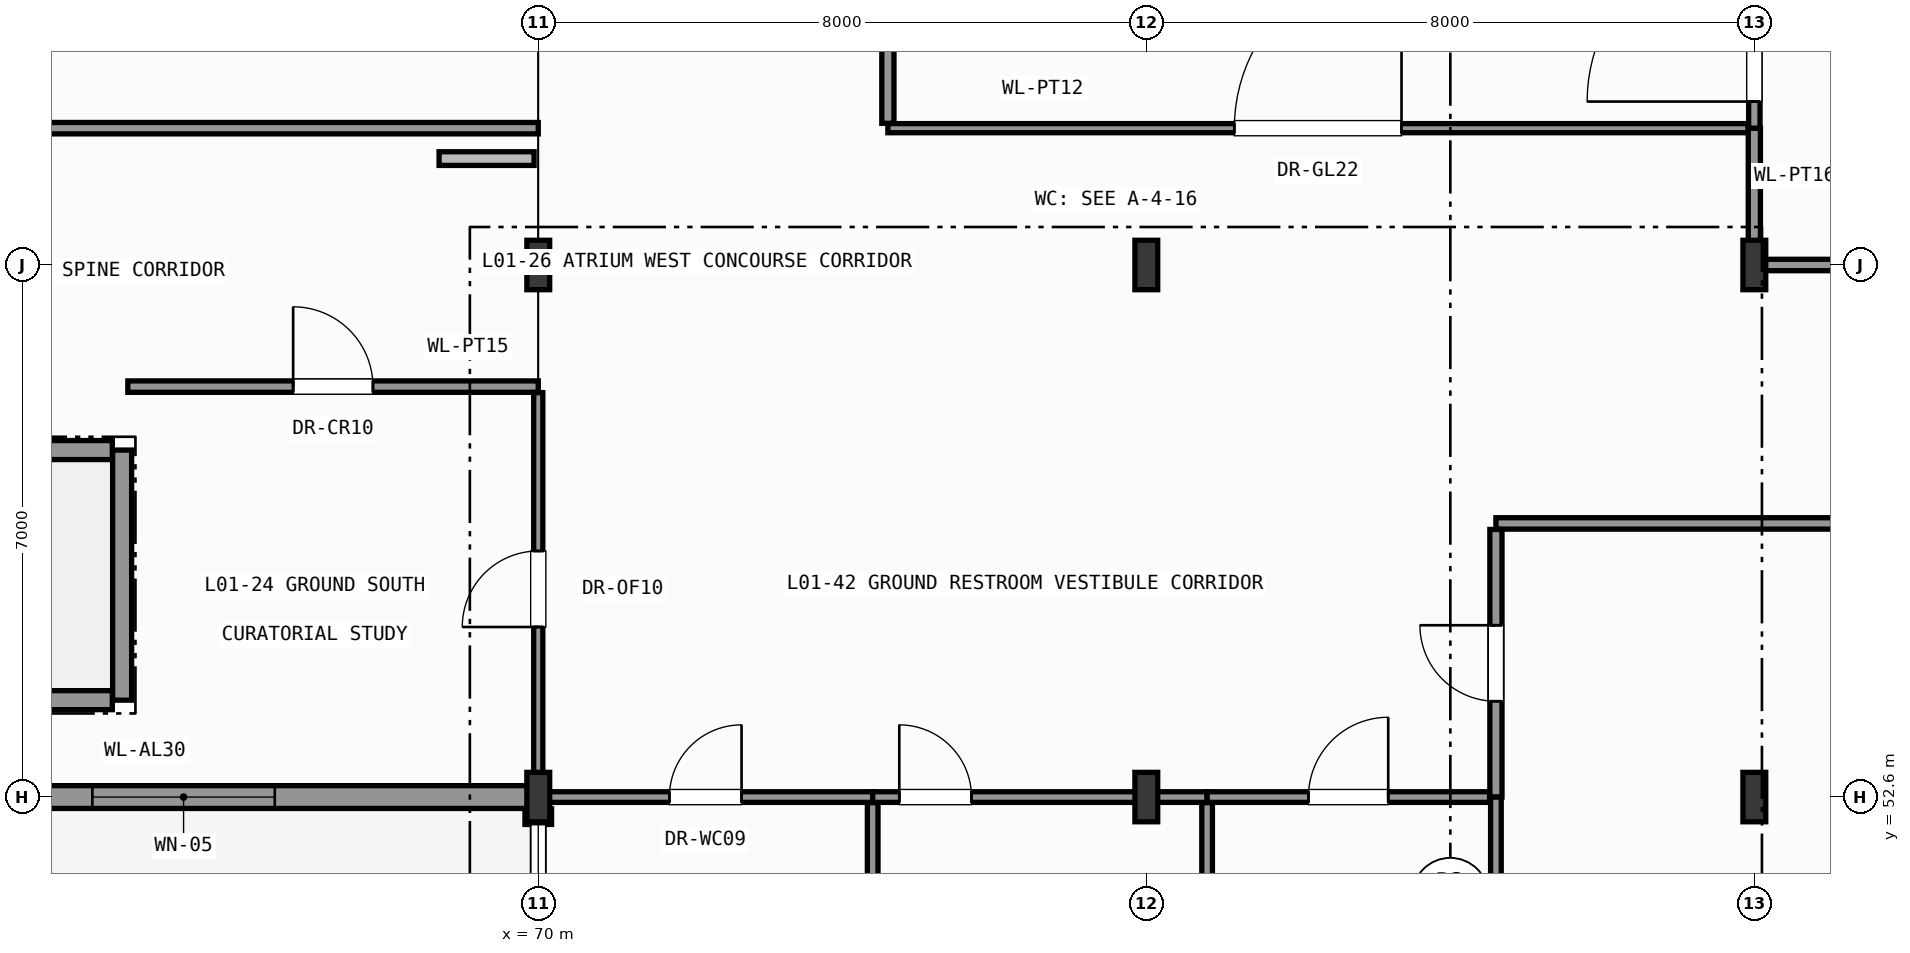
"""IFC4 building model, lengths in metres.
Left out: names, types, materials, properties, quantities, classifications, styles, units other than length and angle.
Written with IfcOpenShell. Run it as: python <this file> out.ifc"""

import sys

from ifc_helpers import new_model, si_unit, direction, frame, frame_2d, origin, origin_2d, place, context, subcontext, project, spatial, rectangle, i_section, extrude, element, fill, save


model = new_model("IFC4")
c1 = context("Model", 3, precision=1e-05, world=origin(), true_north=direction((0.0, 1.0)))
c2 = subcontext(c1, "Body", "Model", "MODEL_VIEW")
j1 = project(units=[si_unit("LENGTHUNIT", "METRE"), si_unit("PLANEANGLEUNIT", "RADIAN")], contexts=[c1])
p1 = place(None, origin())
s1 = spatial("IfcSite", under=j1, at=p1, CompositionType="ELEMENT")
p2 = place(p1, origin())
s2 = spatial("IfcBuilding", under=s1, at=p2, CompositionType="ELEMENT")
p3 = place(p2, origin())
s3 = spatial("IfcBuildingStorey", under=s2, at=p3, CompositionType="ELEMENT", Elevation=0.0)
for number, where, z_axis, x_axis in (
    (1, (70.0, 52.6, 0.0), (0.0, 0.0, 1.0), (1.0, 0.0, 0.0)),
    (2, (70.0, 59.6, 0.0), (0.0, 0.0, 1.0), (1.0, 0.0, 0.0)),
    (3, (78.0, 52.6, 0.0), (0.0, 0.0, 1.0), (1.0, 0.0, 0.0)),
    (4, (78.0, 59.6, 0.0), (0.0, 0.0, 1.0), (1.0, 0.0, 0.0)),
    (5, (86.0, 52.6, 0.0), (0.0, 0.0, 1.0), (1.0, 0.0, 0.0)),
    (6, (86.0, 59.6, 0.0), (0.0, 0.0, 1.0), (1.0, 0.0, 0.0)),
):
    element("IfcColumn", number, at=place(p3, frame(where, z_axis=z_axis, x_axis=x_axis)), inside=s3, PredefinedType="COLUMN", context=c2, shape_type="SweptSolid", body=[
        extrude(i_section(OverallWidth=0.3, OverallDepth=0.65, WebThickness=0.016, FlangeThickness=0.031, FilletRadius=0.027, at=origin_2d()), origin(), (0.0, 0.0, 1.0), 7.8),
    ])
p4 = place(p3, frame((70.0, 52.6, 0.0), z_axis=(0.0, 0.0, 1.0), x_axis=(-1.0, 0.0, 0.0)))
e7 = element("IfcWall", 7, at=p4, inside=s3, PredefinedType="SOLIDWALL", context=c2, shape_type="SweptSolid", body=[
    extrude(rectangle(XDim=14.0, YDim=0.3, at=frame_2d((7.0, 0.0))), origin(), (0.0, 0.0, 1.0), 6.925),
])
p5 = place(p4, frame((3.467, 0.0, 0.95)))
e8 = element("IfcOpeningElement", 8, at=p5, cuts=e7, PredefinedType="OPENING", context=c2, shape_type="SweptSolid", body=[
    extrude(rectangle(XDim=2.4, YDim=4.6, at=frame_2d((1.2, 2.3))), frame((0.0, 0.16, 0.0), z_axis=(0.0, -1.0, 0.0), x_axis=(1.0, 0.0, 0.0)), (0.0, 0.0, 1.0), 0.32),
])
p6 = place(p4, frame((8.133, 0.0, 0.95)))
e9 = element("IfcOpeningElement", 9, at=p6, cuts=e7, PredefinedType="OPENING", context=c2, shape_type="SweptSolid", body=[
    extrude(rectangle(XDim=2.4, YDim=4.6, at=frame_2d((1.2, 2.3))), frame((0.0, 0.16, 0.0), z_axis=(0.0, -1.0, 0.0), x_axis=(1.0, 0.0, 0.0)), (0.0, 0.0, 1.0), 0.32),
])
p7 = place(p3, frame((70.0, 52.446, 0.0), z_axis=(0.0, 0.0, 1.0), x_axis=(0.0, -1.0, 0.0)))
e10 = element("IfcWall", 10, at=p7, inside=s3, PredefinedType="SOLIDWALL", context=c2, shape_type="SweptSolid", body=[
    extrude(rectangle(XDim=0.206, YDim=0.35, at=frame_2d((0.103, 0.0))), origin(), (0.0, 0.0, 1.0), 7.54),
])
p8 = place(p3, frame((64.525, 53.875, 0.0), z_axis=(0.0, 0.0, 1.0), x_axis=(0.0, 1.0, 0.0)))
e11 = element("IfcWall", 11, at=p8, inside=s3, PredefinedType="SHEAR", context=c2, shape_type="SweptSolid", body=[
    extrude(rectangle(XDim=3.29, YDim=0.25, at=frame_2d((1.645, 0.0))), origin(), (0.0, 0.0, 1.0), 7.54),
])
for number, where, z_axis, x_axis in (
    (12, (57.204, 53.875, 0.0), (0.0, 0.0, 1.0), (1.0, 0.0, 0.0)),
    (13, (57.204, 57.165, 0.0), (0.0, 0.0, 1.0), (1.0, 0.0, 0.0)),
):
    element("IfcWall", number, at=place(p3, frame(where, z_axis=z_axis, x_axis=x_axis)), inside=s3, PredefinedType="SHEAR", context=c2, shape_type="SweptSolid", body=[
        extrude(rectangle(XDim=7.192, YDim=0.25, at=frame_2d((3.596, 0.0))), origin(), (0.0, 0.0, 1.0), 7.54),
    ])
p9 = place(p3, frame((43.6, 61.4, 0.0), z_axis=(0.0, 0.0, 1.0), x_axis=(1.0, 0.0, 0.0)))
e14 = element("IfcWall", 14, at=p9, inside=s3, PredefinedType="PARTITIONING", context=c2, shape_type="SweptSolid", body=[
    extrude(rectangle(XDim=26.4, YDim=0.15, at=frame_2d((13.2, 0.0))), origin(), (0.0, 0.0, 1.0), 7.54),
])
p10 = place(p9, frame((12.1, 0.0, 0.0)))
e15 = element("IfcOpeningElement", 15, at=p10, cuts=e14, PredefinedType="OPENING", context=c2, shape_type="SweptSolid", body=[
    extrude(rectangle(XDim=2.2, YDim=2.6, at=frame_2d((1.1, 1.3))), frame((0.0, 0.085, 0.0), z_axis=(0.0, -1.0, 0.0), x_axis=(1.0, 0.0, 0.0)), (0.0, 0.0, 1.0), 0.17),
])
p11 = place(p3, frame((64.6, 58.0, 0.0), z_axis=(0.0, 0.0, 1.0), x_axis=(1.0, 0.0, 0.0)))
e16 = element("IfcWall", 16, at=p11, inside=s3, PredefinedType="PARTITIONING", context=c2, shape_type="SweptSolid", body=[
    extrude(rectangle(XDim=5.4, YDim=0.15, at=frame_2d((2.7, 0.0))), origin(), (0.0, 0.0, 1.0), 7.54),
])
p12 = place(p11, frame((2.175, 0.0, 0.0)))
e17 = element("IfcOpeningElement", 17, at=p12, cuts=e16, PredefinedType="OPENING", context=c2, shape_type="SweptSolid", body=[
    extrude(rectangle(XDim=1.05, YDim=2.2, at=frame_2d((0.525, 1.1))), frame((0.0, 0.085, 0.0), z_axis=(0.0, -1.0, 0.0), x_axis=(1.0, 0.0, 0.0)), (0.0, 0.0, 1.0), 0.17),
])
p13 = place(p3, frame((70.0, 52.754, 0.0), z_axis=(0.0, 0.0, 1.0), x_axis=(0.0, 1.0, 0.0)))
e18 = element("IfcWall", 18, at=p13, inside=s3, PredefinedType="PARTITIONING", context=c2, shape_type="SweptSolid", body=[
    extrude(rectangle(XDim=5.167, YDim=0.12, at=frame_2d((2.583, 0.0))), origin(), (0.0, 0.0, 1.0), 7.235),
])
p14 = place(p13, frame((2.083, 0.0, 0.0)))
e19 = element("IfcOpeningElement", 19, at=p14, cuts=e18, PredefinedType="OPENING", context=c2, shape_type="SweptSolid", body=[
    extrude(rectangle(XDim=1.0, YDim=2.15, at=frame_2d((0.5, 1.075))), frame((0.0, 0.07, 0.0), z_axis=(0.0, -1.0, 0.0), x_axis=(1.0, 0.0, 0.0)), (0.0, 0.0, 1.0), 0.14),
])
p15 = place(p3, frame((86.0, 59.6, 0.0), z_axis=(0.0, 0.0, 1.0), x_axis=(0.0, 1.0, 0.0)))
e20 = element("IfcWall", 20, at=p15, inside=s3, PredefinedType="PARTITIONING", context=c2, shape_type="SweptSolid", body=[
    extrude(rectangle(XDim=1.8, YDim=0.16, at=frame_2d((0.9, 0.0))), origin(), (0.0, 0.0, 1.0), 7.085),
])
p16 = place(p3, frame((86.084, 59.6, 0.0), z_axis=(0.0, 0.0, 1.0), x_axis=(1.0, 0.0, 0.0)))
e21 = element("IfcWall", 21, at=p16, inside=s3, PredefinedType="PARTITIONING", context=c2, shape_type="SweptSolid", body=[
    extrude(rectangle(XDim=23.916, YDim=0.15, at=frame_2d((11.958, 0.0))), origin(), (0.0, 0.0, 1.0), 7.135),
])
p17 = place(p16, frame((10.858, 0.0, 0.0)))
e22 = element("IfcOpeningElement", 22, at=p17, cuts=e21, PredefinedType="OPENING", context=c2, shape_type="SweptSolid", body=[
    extrude(rectangle(XDim=2.2, YDim=2.6, at=frame_2d((1.1, 1.3))), frame((0.0, 0.085, 0.0), z_axis=(0.0, -1.0, 0.0), x_axis=(1.0, 0.0, 0.0)), (0.0, 0.0, 1.0), 0.17),
])
p18 = place(p3, frame((86.0, 61.4, 0.0), z_axis=(0.0, 0.0, 1.0), x_axis=(0.0, 1.0, 0.0)))
e23 = element("IfcWall", 23, at=p18, inside=s3, PredefinedType="PARTITIONING", context=c2, shape_type="SweptSolid", body=[
    extrude(rectangle(XDim=12.8, YDim=0.15, at=frame_2d((6.4, 0.0))), origin(), (0.0, 0.0, 1.0), 7.085),
])
p19 = place(p18, frame((0.35, 0.0, 0.0)))
e24 = element("IfcOpeningElement", 24, at=p19, cuts=e23, PredefinedType="OPENING", context=c2, shape_type="SweptSolid", body=[
    extrude(rectangle(XDim=2.2, YDim=2.6, at=frame_2d((1.1, 1.3))), frame((0.0, 0.085, 0.0), z_axis=(0.0, -1.0, 0.0), x_axis=(1.0, 0.0, 0.0)), (0.0, 0.0, 1.0), 0.17),
])
p20 = place(p3, frame((74.6, 61.4, 0.0), z_axis=(0.0, 0.0, 1.0), x_axis=(1.0, 0.0, 0.0)))
e25 = element("IfcWall", 25, at=p20, inside=s3, PredefinedType="PARTITIONING", context=c2, shape_type="SweptSolid", body=[
    extrude(rectangle(XDim=11.316, YDim=0.12, at=frame_2d((5.658, 0.0))), origin(), (0.0, 0.0, 1.0), 7.54),
])
p21 = place(p20, frame((4.558, 0.0, 0.0)))
e26 = element("IfcOpeningElement", 26, at=p21, cuts=e25, PredefinedType="OPENING", context=c2, shape_type="SweptSolid", body=[
    extrude(rectangle(XDim=2.2, YDim=2.6, at=frame_2d((1.1, 1.3))), frame((0.0, 0.07, 0.0), z_axis=(0.0, -1.0, 0.0), x_axis=(1.0, 0.0, 0.0)), (0.0, 0.0, 1.0), 0.14),
])
p22 = place(p3, frame((74.6, 61.464, 0.0), z_axis=(0.0, 0.0, 1.0), x_axis=(0.0, 1.0, 0.0)))
e27 = element("IfcWall", 27, at=p22, inside=s3, PredefinedType="PARTITIONING", context=c2, shape_type="SweptSolid", body=[
    extrude(rectangle(XDim=12.536, YDim=0.16, at=frame_2d((6.268, 0.0))), origin(), (0.0, 0.0, 1.0), 7.54),
])
p23 = place(p22, frame((5.168, 0.0, 0.0)))
e28 = element("IfcOpeningElement", 28, at=p23, cuts=e27, PredefinedType="OPENING", context=c2, shape_type="SweptSolid", body=[
    extrude(rectangle(XDim=2.2, YDim=2.6, at=frame_2d((1.1, 1.3))), frame((0.0, 0.09, 0.0), z_axis=(0.0, -1.0, 0.0), x_axis=(1.0, 0.0, 0.0)), (0.0, 0.0, 1.0), 0.18),
])
p24 = place(p3, frame((82.6, 56.2, 0.0), z_axis=(0.0, 0.0, 1.0), x_axis=(1.0, 0.0, 0.0)))
e29 = element("IfcWall", 29, at=p24, inside=s3, PredefinedType="PARTITIONING", context=c2, shape_type="SweptSolid", body=[
    extrude(rectangle(XDim=11.4, YDim=0.15, at=frame_2d((5.7, 0.0))), origin(), (0.0, 0.0, 1.0), 7.255),
])
p25 = place(p24, frame((4.6, 0.0, 0.0)))
e30 = element("IfcOpeningElement", 30, at=p25, cuts=e29, PredefinedType="OPENING", context=c2, shape_type="SweptSolid", body=[
    extrude(rectangle(XDim=2.2, YDim=2.6, at=frame_2d((1.1, 1.3))), frame((0.0, 0.085, 0.0), z_axis=(0.0, -1.0, 0.0), x_axis=(1.0, 0.0, 0.0)), (0.0, 0.0, 1.0), 0.17),
])
p26 = place(p3, frame((82.6, 52.6, 0.0), z_axis=(0.0, 0.0, 1.0), x_axis=(0.0, 1.0, 0.0)))
e31 = element("IfcWall", 31, at=p26, inside=s3, PredefinedType="PARTITIONING", context=c2, shape_type="SweptSolid", body=[
    extrude(rectangle(XDim=3.521, YDim=0.16, at=frame_2d((1.76, 0.0))), origin(), (0.0, 0.0, 1.0), 7.54),
])
p27 = place(p26, frame((1.26, 0.0, 0.0)))
e32 = element("IfcOpeningElement", 32, at=p27, cuts=e31, PredefinedType="OPENING", context=c2, shape_type="SweptSolid", body=[
    extrude(rectangle(XDim=1.0, YDim=2.15, at=frame_2d((0.5, 1.075))), frame((0.0, 0.09, 0.0), z_axis=(0.0, -1.0, 0.0), x_axis=(1.0, 0.0, 0.0)), (0.0, 0.0, 1.0), 0.18),
])
p28 = place(p3, frame((82.6, 45.6, 0.0), z_axis=(0.0, 0.0, 1.0), x_axis=(0.0, 1.0, 0.0)))
e33 = element("IfcWall", 33, at=p28, inside=s3, PredefinedType="PARTITIONING", context=c2, shape_type="SweptSolid", body=[
    extrude(rectangle(XDim=7.0, YDim=0.14, at=frame_2d((3.5, 0.0))), origin(), (0.0, 0.0, 1.0), 7.54),
])
p29 = place(p28, frame((2.975, 0.0, 0.0)))
e34 = element("IfcOpeningElement", 34, at=p29, cuts=e33, PredefinedType="OPENING", context=c2, shape_type="SweptSolid", body=[
    extrude(rectangle(XDim=1.05, YDim=2.15, at=frame_2d((0.525, 1.075))), frame((0.0, 0.08, 0.0), z_axis=(0.0, -1.0, 0.0), x_axis=(1.0, 0.0, 0.0)), (0.0, 0.0, 1.0), 0.16),
])
p30 = place(p3, frame((70.0, 52.6, 0.0), z_axis=(0.0, 0.0, 1.0), x_axis=(1.0, 0.0, 0.0)))
e35 = element("IfcWall", 35, at=p30, inside=s3, PredefinedType="PARTITIONING", context=c2, shape_type="SweptSolid", body=[
    extrude(rectangle(XDim=4.4, YDim=0.14, at=frame_2d((2.2, 0.0))), origin(), (0.0, 0.0, 1.0), 7.075),
])
p31 = place(p30, frame((1.725, 0.0, 0.0)))
e36 = element("IfcOpeningElement", 36, at=p31, cuts=e35, PredefinedType="OPENING", context=c2, shape_type="SweptSolid", body=[
    extrude(rectangle(XDim=0.95, YDim=2.1, at=frame_2d((0.475, 1.05))), frame((0.0, 0.08, 0.0), z_axis=(0.0, -1.0, 0.0), x_axis=(1.0, 0.0, 0.0)), (0.0, 0.0, 1.0), 0.16),
])
p32 = place(p3, frame((74.4, 52.6, 0.0), z_axis=(0.0, 0.0, 1.0), x_axis=(1.0, 0.0, 0.0)))
e37 = element("IfcWall", 37, at=p32, inside=s3, PredefinedType="PARTITIONING", context=c2, shape_type="SweptSolid", body=[
    extrude(rectangle(XDim=4.4, YDim=0.14, at=frame_2d((2.2, 0.0))), origin(), (0.0, 0.0, 1.0), 7.075),
])
p33 = place(p32, frame((0.35, 0.0, 0.0)))
e38 = element("IfcOpeningElement", 38, at=p33, cuts=e37, PredefinedType="OPENING", context=c2, shape_type="SweptSolid", body=[
    extrude(rectangle(XDim=0.95, YDim=2.1, at=frame_2d((0.475, 1.05))), frame((0.0, 0.08, 0.0), z_axis=(0.0, -1.0, 0.0), x_axis=(1.0, 0.0, 0.0)), (0.0, 0.0, 1.0), 0.16),
])
p34 = place(p3, frame((78.8, 52.6, 0.0), z_axis=(0.0, 0.0, 1.0), x_axis=(1.0, 0.0, 0.0)))
e39 = element("IfcWall", 39, at=p34, inside=s3, PredefinedType="PARTITIONING", context=c2, shape_type="SweptSolid", body=[
    extrude(rectangle(XDim=3.716, YDim=0.14, at=frame_2d((1.858, 0.0))), origin(), (0.0, 0.0, 1.0), 7.075),
])
p35 = place(p34, frame((1.333, 0.0, 0.0)))
e40 = element("IfcOpeningElement", 40, at=p35, cuts=e39, PredefinedType="OPENING", context=c2, shape_type="SweptSolid", body=[
    extrude(rectangle(XDim=1.05, YDim=2.15, at=frame_2d((0.525, 1.075))), frame((0.0, 0.08, 0.0), z_axis=(0.0, -1.0, 0.0), x_axis=(1.0, 0.0, 0.0)), (0.0, 0.0, 1.0), 0.16),
])
for number, where, z_axis, x_axis in (
    (41, (74.4, 45.6, 0.0), (0.0, 0.0, 1.0), (0.0, 1.0, 0.0)),
    (42, (78.8, 45.6, 0.0), (0.0, 0.0, 1.0), (0.0, 1.0, 0.0)),
):
    element("IfcWall", number, at=place(p3, frame(where, z_axis=z_axis, x_axis=x_axis)), inside=s3, PredefinedType="PARTITIONING", context=c2, shape_type="SweptSolid", body=[
        extrude(rectangle(XDim=6.926, YDim=0.14, at=frame_2d((3.463, 0.0))), origin(), (0.0, 0.0, 1.0), 7.54),
    ])
p36 = place(p5, origin())
e43 = element("IfcWindow", 43, at=p36, inside=s3, PartitioningType="SINGLE_PANEL", PredefinedType="WINDOW", context=c2, shape_type="SweptSolid", body=[
    extrude(rectangle(XDim=2.4, YDim=4.6, at=frame_2d((1.2, 2.3))), frame((0.0, 0.03, 0.0), z_axis=(0.0, -1.0, 0.0), x_axis=(1.0, 0.0, 0.0)), (0.0, 0.0, 1.0), 0.06),
])
fill(e8, e43)
p37 = place(p12, origin())
e44 = element("IfcDoor", 44, at=p37, inside=s3, OperationType="SINGLE_SWING_LEFT", PredefinedType="DOOR", context=c2, shape_type="SweptSolid", body=[
    extrude(rectangle(XDim=1.05, YDim=2.2, at=frame_2d((0.525, 1.1))), frame((0.0, 0.025, 0.0), z_axis=(0.0, -1.0, 0.0), x_axis=(1.0, 0.0, 0.0)), (0.0, 0.0, 1.0), 0.05),
])
fill(e17, e44)
p38 = place(p14, origin())
e45 = element("IfcDoor", 45, at=p38, inside=s3, OperationType="SINGLE_SWING_LEFT", PredefinedType="DOOR", context=c2, shape_type="SweptSolid", body=[
    extrude(rectangle(XDim=1.0, YDim=2.15, at=frame_2d((0.5, 1.075))), frame((0.0, 0.025, 0.0), z_axis=(0.0, -1.0, 0.0), x_axis=(1.0, 0.0, 0.0)), (0.0, 0.0, 1.0), 0.05),
])
fill(e19, e45)
p39 = place(p19, origin())
e46 = element("IfcDoor", 46, at=p39, inside=s3, OperationType="SINGLE_SWING_LEFT", PredefinedType="DOOR", context=c2, shape_type="SweptSolid", body=[
    extrude(rectangle(XDim=2.2, YDim=2.6, at=frame_2d((1.1, 1.3))), frame((0.0, 0.025, 0.0), z_axis=(0.0, -1.0, 0.0), x_axis=(1.0, 0.0, 0.0)), (0.0, 0.0, 1.0), 0.05),
])
fill(e24, e46)
p40 = place(p21, origin())
e47 = element("IfcDoor", 47, at=p40, inside=s3, OperationType="SINGLE_SWING_RIGHT", PredefinedType="DOOR", context=c2, shape_type="SweptSolid", body=[
    extrude(rectangle(XDim=2.2, YDim=2.6, at=frame_2d((1.1, 1.3))), frame((0.0, 0.025, 0.0), z_axis=(0.0, -1.0, 0.0), x_axis=(1.0, 0.0, 0.0)), (0.0, 0.0, 1.0), 0.05),
])
fill(e26, e47)
p41 = place(p27, origin())
e48 = element("IfcDoor", 48, at=p41, inside=s3, OperationType="SINGLE_SWING_RIGHT", PredefinedType="DOOR", context=c2, shape_type="SweptSolid", body=[
    extrude(rectangle(XDim=1.0, YDim=2.15, at=frame_2d((0.5, 1.075))), frame((0.0, 0.025, 0.0), z_axis=(0.0, -1.0, 0.0), x_axis=(1.0, 0.0, 0.0)), (0.0, 0.0, 1.0), 0.05),
])
fill(e32, e48)
p42 = place(p31, origin())
e49 = element("IfcDoor", 49, at=p42, inside=s3, OperationType="SINGLE_SWING_RIGHT", PredefinedType="DOOR", context=c2, shape_type="SweptSolid", body=[
    extrude(rectangle(XDim=0.95, YDim=2.1, at=frame_2d((0.475, 1.05))), frame((0.0, 0.025, 0.0), z_axis=(0.0, -1.0, 0.0), x_axis=(1.0, 0.0, 0.0)), (0.0, 0.0, 1.0), 0.05),
])
fill(e36, e49)
p43 = place(p33, origin())
e50 = element("IfcDoor", 50, at=p43, inside=s3, OperationType="SINGLE_SWING_LEFT", PredefinedType="DOOR", context=c2, shape_type="SweptSolid", body=[
    extrude(rectangle(XDim=0.95, YDim=2.1, at=frame_2d((0.475, 1.05))), frame((0.0, 0.025, 0.0), z_axis=(0.0, -1.0, 0.0), x_axis=(1.0, 0.0, 0.0)), (0.0, 0.0, 1.0), 0.05),
])
fill(e38, e50)
p44 = place(p35, origin())
e51 = element("IfcDoor", 51, at=p44, inside=s3, OperationType="SINGLE_SWING_RIGHT", PredefinedType="DOOR", context=c2, shape_type="SweptSolid", body=[
    extrude(rectangle(XDim=1.05, YDim=2.15, at=frame_2d((0.525, 1.075))), frame((0.0, 0.025, 0.0), z_axis=(0.0, -1.0, 0.0), x_axis=(1.0, 0.0, 0.0)), (0.0, 0.0, 1.0), 0.05),
])
fill(e40, e51)
save(model, sys.argv[1])
